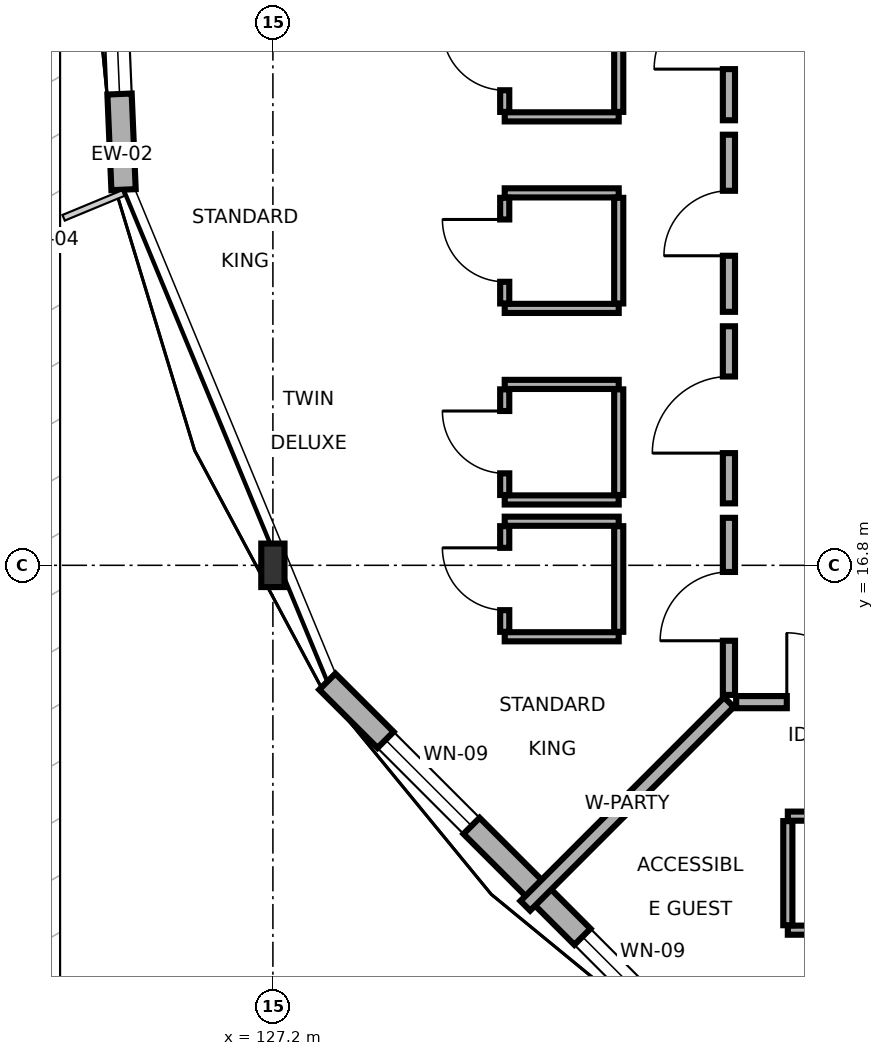
"""IFC4 building model, lengths in metres.
Left out: names, types, materials, properties, quantities, classifications, styles, units other than length and angle.
Written with IfcOpenShell. Run it as: python <this file> out.ifc"""

import sys

from ifc_helpers import new_model, si_unit, direction, frame, frame_2d, origin, origin_2d, place, context, subcontext, project, spatial, rectangle, i_section, extrude, element, fill, save


model = new_model("IFC4")
c1 = context("Model", 3, precision=1e-05, world=origin(), true_north=direction((0.0, 1.0)))
c2 = subcontext(c1, "Body", "Model", "MODEL_VIEW")
j1 = project(units=[si_unit("LENGTHUNIT", "METRE"), si_unit("PLANEANGLEUNIT", "RADIAN")], contexts=[c1])
p1 = place(None, origin())
s1 = spatial("IfcSite", under=j1, at=p1, CompositionType="ELEMENT")
p2 = place(p1, origin())
s2 = spatial("IfcBuilding", under=s1, at=p2, CompositionType="ELEMENT")
p3 = place(p2, frame((0.0, 0.0, 14.7)))
s3 = spatial("IfcBuildingStorey", under=s2, at=p3, CompositionType="ELEMENT", Elevation=14.7)
p4 = place(p3, frame((127.2, 16.8, 0.0), z_axis=(0.0, 0.0, 1.0), x_axis=(1.0, 0.0, 0.0)))
e1 = element("IfcColumn", 1, at=p4, inside=s3, PredefinedType="COLUMN", context=c2, shape_type="SweptSolid", body=[
    extrude(i_section(OverallWidth=0.306, OverallDepth=0.572, WebThickness=0.021, FlangeThickness=0.04, FilletRadius=0.027, at=origin_2d()), origin(), (0.0, 0.0, 1.0), 3.4),
])
p5 = place(p3, frame((124.89, 29.955, 0.0), z_axis=(0.0, 0.0, 1.0), x_axis=(0.041996210664, -0.99911776998, 0.0)))
e2 = element("IfcWall", 2, at=p5, inside=s3, PredefinedType="SOLIDWALL", context=c2, shape_type="SweptSolid", body=[
    extrude(rectangle(XDim=8.22, YDim=0.32, at=frame_2d((4.11, 0.0))), origin(), (0.0, 0.0, 1.0), 2.75),
])
p6 = place(p5, frame((3.21, 0.0, 0.0)))
e3 = element("IfcOpeningElement", 3, at=p6, cuts=e2, PredefinedType="OPENING", context=c2, shape_type="SweptSolid", body=[
    extrude(rectangle(XDim=1.8, YDim=2.2, at=frame_2d((0.9, 1.1))), frame((0.0, 0.17, 0.0), z_axis=(0.0, -1.0, 0.0), x_axis=(1.0, 0.0, 0.0)), (0.0, 0.0, 1.0), 0.34),
])
p7 = place(p5, frame((0.299, 0.0, 0.8)))
e4 = element("IfcOpeningElement", 4, at=p7, cuts=e2, PredefinedType="OPENING", context=c2, shape_type="SweptSolid", body=[
    extrude(rectangle(XDim=1.6, YDim=1.5, at=frame_2d((0.8, 0.75))), frame((0.0, 0.17, 0.0), z_axis=(0.0, -1.0, 0.0), x_axis=(1.0, 0.0, 0.0)), (0.0, 0.0, 1.0), 0.34),
])
p8 = place(p5, frame((5.361, 0.0, 0.8)))
e5 = element("IfcOpeningElement", 5, at=p8, cuts=e2, PredefinedType="OPENING", context=c2, shape_type="SweptSolid", body=[
    extrude(rectangle(XDim=1.6, YDim=1.5, at=frame_2d((0.8, 0.75))), frame((0.0, 0.17, 0.0), z_axis=(0.0, -1.0, 0.0), x_axis=(1.0, 0.0, 0.0)), (0.0, 0.0, 1.0), 0.34),
])
p9 = place(p3, frame((127.916, 15.27, 0.0), z_axis=(0.0, 0.0, 1.0), x_axis=(0.707089356394, -0.707124205549, 0.0)))
e6 = element("IfcWall", 6, at=p9, inside=s3, PredefinedType="SOLIDWALL", context=c2, shape_type="SweptSolid", body=[
    extrude(rectangle(XDim=7.006, YDim=0.3, at=frame_2d((3.503, 0.0))), origin(), (0.0, 0.0, 1.0), 3.215),
])
p10 = place(p9, frame((4.746, 0.0, 0.8)))
e7 = element("IfcOpeningElement", 7, at=p10, cuts=e6, PredefinedType="OPENING", context=c2, shape_type="SweptSolid", body=[
    extrude(rectangle(XDim=1.6, YDim=1.5, at=frame_2d((0.8, 0.75))), frame((0.0, 0.16, 0.0), z_axis=(0.0, -1.0, 0.0), x_axis=(1.0, 0.0, 0.0)), (0.0, 0.0, 1.0), 0.32),
])
p11 = place(p9, frame((1.083, 0.0, 0.8)))
e8 = element("IfcOpeningElement", 8, at=p11, cuts=e6, PredefinedType="OPENING", context=c2, shape_type="SweptSolid", body=[
    extrude(rectangle(XDim=1.6, YDim=1.5, at=frame_2d((0.8, 0.75))), frame((0.0, 0.16, 0.0), z_axis=(0.0, -1.0, 0.0), x_axis=(1.0, 0.0, 0.0)), (0.0, 0.0, 1.0), 0.32),
])
p12 = place(p3, frame((133.295, 15.0, 0.0), z_axis=(0.0, 0.0, 1.0), x_axis=(1.0, 0.0, 0.0)))
e9 = element("IfcWall", 9, at=p12, inside=s3, PredefinedType="PARTITIONING", context=c2, shape_type="SweptSolid", body=[
    extrude(rectangle(XDim=2.245, YDim=0.16, at=frame_2d((1.123, 0.0))), origin(), (0.0, 0.0, 1.0), 3.215),
])
p13 = place(p12, frame((0.667, 0.0, 0.0)))
e10 = element("IfcOpeningElement", 10, at=p13, cuts=e9, PredefinedType="OPENING", context=c2, shape_type="SweptSolid", body=[
    extrude(rectangle(XDim=0.912, YDim=2.13, at=frame_2d((0.456, 1.065))), frame((0.0, 0.09, 0.0), z_axis=(0.0, -1.0, 0.0), x_axis=(1.0, 0.0, 0.0)), (0.0, 0.0, 1.0), 0.18),
])
p14 = place(p3, frame((133.975, 12.0, 0.0), z_axis=(0.0, 0.0, 1.0), x_axis=(1.0, 0.0, 0.0)))
e11 = element("IfcWall", 11, at=p14, inside=s3, PredefinedType="PARTITIONING", context=c2, shape_type="SweptSolid", body=[
    extrude(rectangle(XDim=1.52, YDim=0.12, at=frame_2d((0.76, 0.0))), origin(), (0.0, 0.0, 1.0), 2.75),
])
p15 = place(p14, frame((0.35, 0.0, 0.0)))
e12 = element("IfcOpeningElement", 12, at=p15, cuts=e11, PredefinedType="OPENING", context=c2, shape_type="SweptSolid", body=[
    extrude(rectangle(XDim=0.82, YDim=2.08, at=frame_2d((0.41, 1.04))), frame((0.0, 0.07, 0.0), z_axis=(0.0, -1.0, 0.0), x_axis=(1.0, 0.0, 0.0)), (0.0, 0.0, 1.0), 0.14),
])
p16 = place(p3, frame((133.975, 13.5, 0.0), z_axis=(0.0, 0.0, 1.0), x_axis=(1.0, 0.0, 0.0)))
e13 = element("IfcWall", 13, at=p16, inside=s3, PredefinedType="PARTITIONING", context=c2, shape_type="SweptSolid", body=[
    extrude(rectangle(XDim=1.52, YDim=0.12, at=frame_2d((0.76, 0.0))), origin(), (0.0, 0.0, 1.0), 3.215),
])
p17 = place(p3, frame((133.975, 12.065, 0.0), z_axis=(0.0, 0.0, 1.0), x_axis=(0.0, 1.0, 0.0)))
e14 = element("IfcWall", 14, at=p17, inside=s3, PredefinedType="PARTITIONING", context=c2, shape_type="SweptSolid", body=[
    extrude(rectangle(XDim=1.37, YDim=0.12, at=frame_2d((0.685, 0.0))), origin(), (0.0, 0.0, 1.0), 3.215),
])
p18 = place(p3, frame((133.2, 15.0, 0.0), z_axis=(0.0, 0.0, 1.0), x_axis=(-0.707106781187, -0.707106781187, 0.0)))
e15 = element("IfcWall", 15, at=p18, inside=s3, PredefinedType="PARTITIONING", context=c2, shape_type="SweptSolid", body=[
    extrude(rectangle(XDim=3.789, YDim=0.18, at=frame_2d((1.894, 0.0))), origin(), (0.0, 0.0, 1.0), 2.76),
])
p19 = place(p3, frame((133.2, 22.655, 0.0), z_axis=(0.0, 0.0, 1.0), x_axis=(0.0, 1.0, 0.0)))
e16 = element("IfcWall", 16, at=p19, inside=s3, PredefinedType="PARTITIONING", context=c2, shape_type="SweptSolid", body=[
    extrude(rectangle(XDim=2.33, YDim=0.16, at=frame_2d((1.165, 0.0))), origin(), (0.0, 0.0, 1.0), 2.75),
])
p20 = place(p19, frame((0.673, 0.0, 0.0)))
e17 = element("IfcOpeningElement", 17, at=p20, cuts=e16, PredefinedType="OPENING", context=c2, shape_type="SweptSolid", body=[
    extrude(rectangle(XDim=0.984, YDim=2.07, at=frame_2d((0.492, 1.035))), frame((0.0, 0.09, 0.0), z_axis=(0.0, -1.0, 0.0), x_axis=(1.0, 0.0, 0.0)), (0.0, 0.0, 1.0), 0.18),
])
p21 = place(p3, frame((130.25, 22.7, 0.0), z_axis=(0.0, 0.0, 1.0), x_axis=(1.0, 0.0, 0.0)))
e18 = element("IfcWall", 18, at=p21, inside=s3, PredefinedType="PARTITIONING", context=c2, shape_type="SweptSolid", body=[
    extrude(rectangle(XDim=1.5, YDim=0.12, at=frame_2d((0.75, 0.0))), origin(), (0.0, 0.0, 1.0), 3.215),
])
p22 = place(p3, frame((130.25, 22.765, 0.0), z_axis=(0.0, 0.0, 1.0), x_axis=(0.0, 1.0, 0.0)))
e19 = element("IfcWall", 19, at=p22, inside=s3, PredefinedType="PARTITIONING", context=c2, shape_type="SweptSolid", body=[
    extrude(rectangle(XDim=1.39, YDim=0.12, at=frame_2d((0.695, 0.0))), origin(), (0.0, 0.0, 1.0), 2.75),
])
p23 = place(p22, frame((0.285, 0.0, 0.0)))
e20 = element("IfcOpeningElement", 20, at=p23, cuts=e19, PredefinedType="OPENING", context=c2, shape_type="SweptSolid", body=[
    extrude(rectangle(XDim=0.82, YDim=2.08, at=frame_2d((0.41, 1.04))), frame((0.0, 0.07, 0.0), z_axis=(0.0, -1.0, 0.0), x_axis=(1.0, 0.0, 0.0)), (0.0, 0.0, 1.0), 0.14),
])
p24 = place(p3, frame((131.75, 22.765, 0.0), z_axis=(0.0, 0.0, 1.0), x_axis=(0.0, 1.0, 0.0)))
e21 = element("IfcWall", 21, at=p24, inside=s3, PredefinedType="PARTITIONING", context=c2, shape_type="SweptSolid", body=[
    extrude(rectangle(XDim=1.39, YDim=0.12, at=frame_2d((0.695, 0.0))), origin(), (0.0, 0.0, 1.0), 2.75),
])
p25 = place(p3, frame((133.2, 20.135, 0.0), z_axis=(0.0, 0.0, 1.0), x_axis=(0.0, 1.0, 0.0)))
e22 = element("IfcWall", 22, at=p25, inside=s3, PredefinedType="PARTITIONING", context=c2, shape_type="SweptSolid", body=[
    extrude(rectangle(XDim=2.33, YDim=0.16, at=frame_2d((1.165, 0.0))), origin(), (0.0, 0.0, 1.0), 3.215),
])
p26 = place(p25, frame((0.738, 0.0, 0.0)))
e23 = element("IfcOpeningElement", 23, at=p26, cuts=e22, PredefinedType="OPENING", context=c2, shape_type="SweptSolid", body=[
    extrude(rectangle(XDim=0.855, YDim=2.05, at=frame_2d((0.427, 1.025))), frame((0.0, 0.09, 0.0), z_axis=(0.0, -1.0, 0.0), x_axis=(1.0, 0.0, 0.0)), (0.0, 0.0, 1.0), 0.18),
])
for number, where, z_axis, x_axis in (
    (24, (130.25, 20.18, 0.0), (0.0, 0.0, 1.0), (1.0, 0.0, 0.0)),
    (25, (130.25, 21.7, 0.0), (0.0, 0.0, 1.0), (1.0, 0.0, 0.0)),
):
    element("IfcWall", number, at=place(p3, frame(where, z_axis=z_axis, x_axis=x_axis)), inside=s3, PredefinedType="PARTITIONING", context=c2, shape_type="SweptSolid", body=[
        extrude(rectangle(XDim=1.5, YDim=0.12, at=frame_2d((0.75, 0.0))), origin(), (0.0, 0.0, 1.0), 3.215),
    ])
p27 = place(p3, frame((130.25, 20.245, 0.0), z_axis=(0.0, 0.0, 1.0), x_axis=(0.0, 1.0, 0.0)))
e26 = element("IfcWall", 26, at=p27, inside=s3, PredefinedType="PARTITIONING", context=c2, shape_type="SweptSolid", body=[
    extrude(rectangle(XDim=1.39, YDim=0.12, at=frame_2d((0.695, 0.0))), origin(), (0.0, 0.0, 1.0), 3.215),
])
p28 = place(p27, frame((0.285, 0.0, 0.0)))
e27 = element("IfcOpeningElement", 27, at=p28, cuts=e26, PredefinedType="OPENING", context=c2, shape_type="SweptSolid", body=[
    extrude(rectangle(XDim=0.82, YDim=2.08, at=frame_2d((0.41, 1.04))), frame((0.0, 0.07, 0.0), z_axis=(0.0, -1.0, 0.0), x_axis=(1.0, 0.0, 0.0)), (0.0, 0.0, 1.0), 0.14),
])
p29 = place(p3, frame((131.75, 20.245, 0.0), z_axis=(0.0, 0.0, 1.0), x_axis=(0.0, 1.0, 0.0)))
e28 = element("IfcWall", 28, at=p29, inside=s3, PredefinedType="PARTITIONING", context=c2, shape_type="SweptSolid", body=[
    extrude(rectangle(XDim=1.39, YDim=0.12, at=frame_2d((0.695, 0.0))), origin(), (0.0, 0.0, 1.0), 3.215),
])
p30 = place(p3, frame((133.2, 17.615, 0.0), z_axis=(0.0, 0.0, 1.0), x_axis=(0.0, 1.0, 0.0)))
e29 = element("IfcWall", 29, at=p30, inside=s3, PredefinedType="PARTITIONING", context=c2, shape_type="SweptSolid", body=[
    extrude(rectangle(XDim=2.33, YDim=0.16, at=frame_2d((1.165, 0.0))), origin(), (0.0, 0.0, 1.0), 3.215),
])
p31 = place(p30, frame((0.661, 0.0, 0.0)))
e30 = element("IfcOpeningElement", 30, at=p31, cuts=e29, PredefinedType="OPENING", context=c2, shape_type="SweptSolid", body=[
    extrude(rectangle(XDim=1.008, YDim=2.13, at=frame_2d((0.504, 1.065))), frame((0.0, 0.09, 0.0), z_axis=(0.0, -1.0, 0.0), x_axis=(1.0, 0.0, 0.0)), (0.0, 0.0, 1.0), 0.18),
])
for number, where, z_axis, x_axis in (
    (31, (130.25, 17.66, 0.0), (0.0, 0.0, 1.0), (1.0, 0.0, 0.0)),
    (32, (130.25, 19.18, 0.0), (0.0, 0.0, 1.0), (1.0, 0.0, 0.0)),
):
    element("IfcWall", number, at=place(p3, frame(where, z_axis=z_axis, x_axis=x_axis)), inside=s3, PredefinedType="PARTITIONING", context=c2, shape_type="SweptSolid", body=[
        extrude(rectangle(XDim=1.5, YDim=0.12, at=frame_2d((0.75, 0.0))), origin(), (0.0, 0.0, 1.0), 3.215),
    ])
p32 = place(p3, frame((130.25, 17.725, 0.0), z_axis=(0.0, 0.0, 1.0), x_axis=(0.0, 1.0, 0.0)))
e33 = element("IfcWall", 33, at=p32, inside=s3, PredefinedType="PARTITIONING", context=c2, shape_type="SweptSolid", body=[
    extrude(rectangle(XDim=1.39, YDim=0.12, at=frame_2d((0.695, 0.0))), origin(), (0.0, 0.0, 1.0), 3.215),
])
p33 = place(p32, frame((0.285, 0.0, 0.0)))
e34 = element("IfcOpeningElement", 34, at=p33, cuts=e33, PredefinedType="OPENING", context=c2, shape_type="SweptSolid", body=[
    extrude(rectangle(XDim=0.82, YDim=2.08, at=frame_2d((0.41, 1.04))), frame((0.0, 0.07, 0.0), z_axis=(0.0, -1.0, 0.0), x_axis=(1.0, 0.0, 0.0)), (0.0, 0.0, 1.0), 0.14),
])
p34 = place(p3, frame((131.75, 17.725, 0.0), z_axis=(0.0, 0.0, 1.0), x_axis=(0.0, 1.0, 0.0)))
e35 = element("IfcWall", 35, at=p34, inside=s3, PredefinedType="PARTITIONING", context=c2, shape_type="SweptSolid", body=[
    extrude(rectangle(XDim=1.39, YDim=0.12, at=frame_2d((0.695, 0.0))), origin(), (0.0, 0.0, 1.0), 3.215),
])
p35 = place(p3, frame((133.2, 15.095, 0.0), z_axis=(0.0, 0.0, 1.0), x_axis=(0.0, 1.0, 0.0)))
e36 = element("IfcWall", 36, at=p35, inside=s3, PredefinedType="PARTITIONING", context=c2, shape_type="SweptSolid", body=[
    extrude(rectangle(XDim=2.33, YDim=0.16, at=frame_2d((1.165, 0.0))), origin(), (0.0, 0.0, 1.0), 2.75),
])
p36 = place(p35, frame((0.712, 0.0, 0.0)))
e37 = element("IfcOpeningElement", 37, at=p36, cuts=e36, PredefinedType="OPENING", context=c2, shape_type="SweptSolid", body=[
    extrude(rectangle(XDim=0.905, YDim=2.05, at=frame_2d((0.453, 1.025))), frame((0.0, 0.09, 0.0), z_axis=(0.0, -1.0, 0.0), x_axis=(1.0, 0.0, 0.0)), (0.0, 0.0, 1.0), 0.18),
])
for number, where, z_axis, x_axis in (
    (38, (130.25, 15.86, 0.0), (0.0, 0.0, 1.0), (1.0, 0.0, 0.0)),
    (39, (130.25, 17.38, 0.0), (0.0, 0.0, 1.0), (1.0, 0.0, 0.0)),
):
    element("IfcWall", number, at=place(p3, frame(where, z_axis=z_axis, x_axis=x_axis)), inside=s3, PredefinedType="PARTITIONING", context=c2, shape_type="SweptSolid", body=[
        extrude(rectangle(XDim=1.5, YDim=0.12, at=frame_2d((0.75, 0.0))), origin(), (0.0, 0.0, 1.0), 3.215),
    ])
p37 = place(p3, frame((130.25, 15.925, 0.0), z_axis=(0.0, 0.0, 1.0), x_axis=(0.0, 1.0, 0.0)))
e40 = element("IfcWall", 40, at=p37, inside=s3, PredefinedType="PARTITIONING", context=c2, shape_type="SweptSolid", body=[
    extrude(rectangle(XDim=1.39, YDim=0.12, at=frame_2d((0.695, 0.0))), origin(), (0.0, 0.0, 1.0), 2.75),
])
p38 = place(p37, frame((0.285, 0.0, 0.0)))
e41 = element("IfcOpeningElement", 41, at=p38, cuts=e40, PredefinedType="OPENING", context=c2, shape_type="SweptSolid", body=[
    extrude(rectangle(XDim=0.82, YDim=2.08, at=frame_2d((0.41, 1.04))), frame((0.0, 0.07, 0.0), z_axis=(0.0, -1.0, 0.0), x_axis=(1.0, 0.0, 0.0)), (0.0, 0.0, 1.0), 0.14),
])
p39 = place(p3, frame((131.75, 15.925, 0.0), z_axis=(0.0, 0.0, 1.0), x_axis=(0.0, 1.0, 0.0)))
e42 = element("IfcWall", 42, at=p39, inside=s3, PredefinedType="PARTITIONING", context=c2, shape_type="SweptSolid", body=[
    extrude(rectangle(XDim=1.39, YDim=0.12, at=frame_2d((0.695, 0.0))), origin(), (0.0, 0.0, 1.0), 2.75),
])
p40 = place(p8, origin())
e43 = element("IfcWindow", 43, at=p40, inside=s3, PartitioningType="SINGLE_PANEL", PredefinedType="WINDOW", context=c2, shape_type="SweptSolid", body=[
    extrude(rectangle(XDim=1.6, YDim=1.5, at=frame_2d((0.8, 0.75))), frame((0.0, 0.03, 0.0), z_axis=(0.0, -1.0, 0.0), x_axis=(1.0, 0.0, 0.0)), (0.0, 0.0, 1.0), 0.06),
])
fill(e5, e43)
p41 = place(p10, origin())
e44 = element("IfcWindow", 44, at=p41, inside=s3, PartitioningType="SINGLE_PANEL", PredefinedType="WINDOW", context=c2, shape_type="SweptSolid", body=[
    extrude(rectangle(XDim=1.6, YDim=1.5, at=frame_2d((0.8, 0.75))), frame((0.0, 0.03, 0.0), z_axis=(0.0, -1.0, 0.0), x_axis=(1.0, 0.0, 0.0)), (0.0, 0.0, 1.0), 0.06),
])
fill(e7, e44)
p42 = place(p11, origin())
e45 = element("IfcWindow", 45, at=p42, inside=s3, PartitioningType="SINGLE_PANEL", PredefinedType="WINDOW", context=c2, shape_type="SweptSolid", body=[
    extrude(rectangle(XDim=1.6, YDim=1.5, at=frame_2d((0.8, 0.75))), frame((0.0, 0.03, 0.0), z_axis=(0.0, -1.0, 0.0), x_axis=(1.0, 0.0, 0.0)), (0.0, 0.0, 1.0), 0.06),
])
fill(e8, e45)
p43 = place(p13, origin())
e46 = element("IfcDoor", 46, at=p43, inside=s3, OperationType="SINGLE_SWING_LEFT", PredefinedType="DOOR", context=c2, shape_type="SweptSolid", body=[
    extrude(rectangle(XDim=0.912, YDim=2.13, at=frame_2d((0.456, 1.065))), frame((0.0, 0.025, 0.0), z_axis=(0.0, -1.0, 0.0), x_axis=(1.0, 0.0, 0.0)), (0.0, 0.0, 1.0), 0.05),
])
fill(e10, e46)
p44 = place(p20, origin())
e47 = element("IfcDoor", 47, at=p44, inside=s3, OperationType="SINGLE_SWING_LEFT", PredefinedType="DOOR", context=c2, shape_type="SweptSolid", body=[
    extrude(rectangle(XDim=0.984, YDim=2.07, at=frame_2d((0.492, 1.035))), frame((0.0, 0.025, 0.0), z_axis=(0.0, -1.0, 0.0), x_axis=(1.0, 0.0, 0.0)), (0.0, 0.0, 1.0), 0.05),
])
fill(e17, e47)
p45 = place(p23, origin())
e48 = element("IfcDoor", 48, at=p45, inside=s3, OperationType="SINGLE_SWING_RIGHT", PredefinedType="DOOR", context=c2, shape_type="SweptSolid", body=[
    extrude(rectangle(XDim=0.82, YDim=2.08, at=frame_2d((0.41, 1.04))), frame((0.0, 0.025, 0.0), z_axis=(0.0, -1.0, 0.0), x_axis=(1.0, 0.0, 0.0)), (0.0, 0.0, 1.0), 0.05),
])
fill(e20, e48)
p46 = place(p26, origin())
e49 = element("IfcDoor", 49, at=p46, inside=s3, OperationType="SINGLE_SWING_LEFT", PredefinedType="DOOR", context=c2, shape_type="SweptSolid", body=[
    extrude(rectangle(XDim=0.855, YDim=2.05, at=frame_2d((0.427, 1.025))), frame((0.0, 0.025, 0.0), z_axis=(0.0, -1.0, 0.0), x_axis=(1.0, 0.0, 0.0)), (0.0, 0.0, 1.0), 0.05),
])
fill(e23, e49)
p47 = place(p28, origin())
e50 = element("IfcDoor", 50, at=p47, inside=s3, OperationType="SINGLE_SWING_RIGHT", PredefinedType="DOOR", context=c2, shape_type="SweptSolid", body=[
    extrude(rectangle(XDim=0.82, YDim=2.08, at=frame_2d((0.41, 1.04))), frame((0.0, 0.025, 0.0), z_axis=(0.0, -1.0, 0.0), x_axis=(1.0, 0.0, 0.0)), (0.0, 0.0, 1.0), 0.05),
])
fill(e27, e50)
p48 = place(p31, origin())
e51 = element("IfcDoor", 51, at=p48, inside=s3, OperationType="SINGLE_SWING_LEFT", PredefinedType="DOOR", context=c2, shape_type="SweptSolid", body=[
    extrude(rectangle(XDim=1.008, YDim=2.13, at=frame_2d((0.504, 1.065))), frame((0.0, 0.025, 0.0), z_axis=(0.0, -1.0, 0.0), x_axis=(1.0, 0.0, 0.0)), (0.0, 0.0, 1.0), 0.05),
])
fill(e30, e51)
p49 = place(p33, origin())
e52 = element("IfcDoor", 52, at=p49, inside=s3, OperationType="SINGLE_SWING_RIGHT", PredefinedType="DOOR", context=c2, shape_type="SweptSolid", body=[
    extrude(rectangle(XDim=0.82, YDim=2.08, at=frame_2d((0.41, 1.04))), frame((0.0, 0.025, 0.0), z_axis=(0.0, -1.0, 0.0), x_axis=(1.0, 0.0, 0.0)), (0.0, 0.0, 1.0), 0.05),
])
fill(e34, e52)
p50 = place(p36, origin())
e53 = element("IfcDoor", 53, at=p50, inside=s3, OperationType="SINGLE_SWING_LEFT", PredefinedType="DOOR", context=c2, shape_type="SweptSolid", body=[
    extrude(rectangle(XDim=0.905, YDim=2.05, at=frame_2d((0.453, 1.025))), frame((0.0, 0.025, 0.0), z_axis=(0.0, -1.0, 0.0), x_axis=(1.0, 0.0, 0.0)), (0.0, 0.0, 1.0), 0.05),
])
fill(e37, e53)
p51 = place(p38, origin())
e54 = element("IfcDoor", 54, at=p51, inside=s3, OperationType="SINGLE_SWING_RIGHT", PredefinedType="DOOR", context=c2, shape_type="SweptSolid", body=[
    extrude(rectangle(XDim=0.82, YDim=2.08, at=frame_2d((0.41, 1.04))), frame((0.0, 0.025, 0.0), z_axis=(0.0, -1.0, 0.0), x_axis=(1.0, 0.0, 0.0)), (0.0, 0.0, 1.0), 0.05),
])
fill(e41, e54)
save(model, sys.argv[1])
